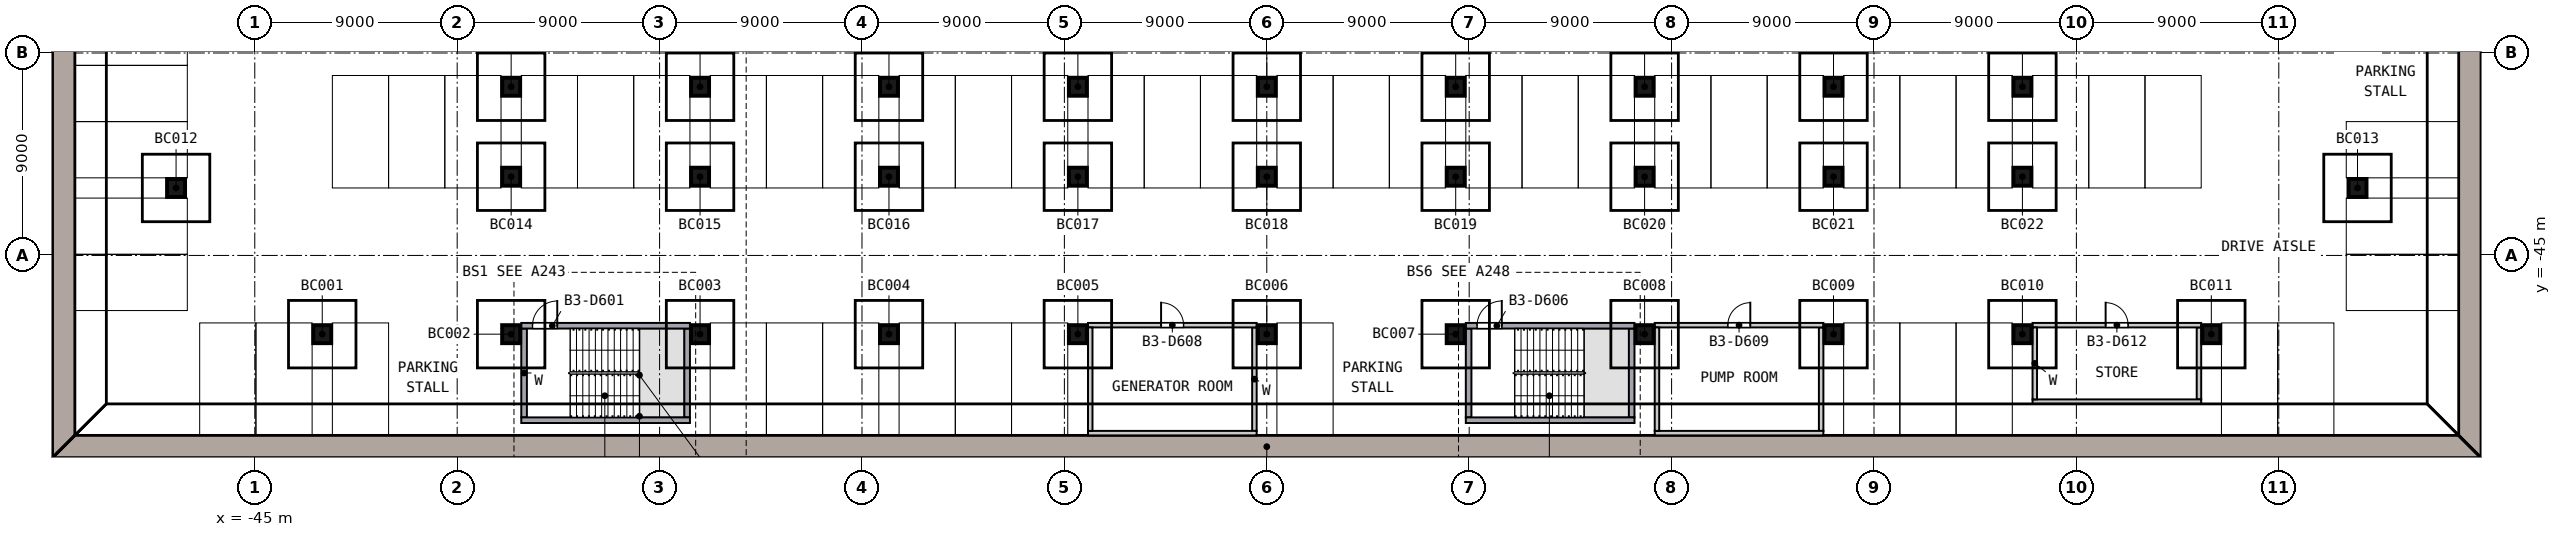
"""IFC4 building model, lengths in metres.
Left out: names, types, materials, properties, quantities, classifications, styles, units other than length and angle.
Written with IfcOpenShell. Run it as: python <this file> out.ifc"""

import sys

from ifc_helpers import new_model, si_unit, direction, frame, frame_2d, origin, origin_2d, place, context, subcontext, project, spatial, polyline, rectangle, outline, extrude, element, fill, save


model = new_model("IFC4")
c1 = context("Model", 3, precision=1e-05, world=origin(), true_north=direction((0.0, 1.0)))
c2 = subcontext(c1, "Body", "Model", "MODEL_VIEW")
j1 = project(units=[si_unit("LENGTHUNIT", "METRE"), si_unit("PLANEANGLEUNIT", "RADIAN")], contexts=[c1])
p1 = place(None, origin())
s1 = spatial("IfcSite", under=j1, at=p1, CompositionType="ELEMENT")
p2 = place(p1, origin())
s2 = spatial("IfcBuilding", under=s1, at=p2, CompositionType="ELEMENT")
p3 = place(p2, frame((0.0, 0.0, -11.7)))
s3 = spatial("IfcBuildingStorey", under=s2, at=p3, CompositionType="ELEMENT", Elevation=-11.7)
p4 = place(p3, frame((0.0, 0.0, -0.8)))
e1 = element("IfcWall", 1, at=p4, inside=s3, PredefinedType="SOLIDWALL", context=c2, shape_type="SweptSolid", body=[
    extrude(outline(polyline([(-54.0, 54.0), (-54.0, -54.0), (-53.0, -53.0), (-53.0, 53.0), (-54.0, 54.0)])), origin(), (0.0, 0.0, 1.0), 4.7),
])
p5 = place(p3, frame((0.0, 0.0, -0.8)))
e2 = element("IfcWall", 2, at=p5, inside=s3, PredefinedType="SOLIDWALL", context=c2, shape_type="SweptSolid", body=[
    extrude(outline(polyline([(-54.0, -54.0), (54.0, -54.0), (53.0, -53.0), (-53.0, -53.0), (-54.0, -54.0)])), origin(), (0.0, 0.0, 1.0), 4.7),
])
p6 = place(p3, frame((0.0, 0.0, -0.8)))
e3 = element("IfcWall", 3, at=p6, inside=s3, PredefinedType="SOLIDWALL", context=c2, shape_type="SweptSolid", body=[
    extrude(outline(polyline([(54.0, -54.0), (54.0, 54.0), (53.0, 53.0), (53.0, -53.0), (54.0, -54.0)])), origin(), (0.0, 0.0, 1.0), 4.7),
])
for number, where, z_axis, x_axis in (
    (4, (-42.0, -48.5, -0.8), (0.0, 0.0, 1.0), (1.0, 0.0, 0.0)),
    (5, (-33.6, -48.5, -0.8), (0.0, 0.0, 1.0), (1.0, 0.0, 0.0)),
    (6, (-25.2, -48.5, -0.8), (0.0, 0.0, 1.0), (1.0, 0.0, 0.0)),
    (7, (-16.8, -48.5, -0.8), (0.0, 0.0, 1.0), (1.0, 0.0, 0.0)),
    (8, (-8.4, -48.5, -0.8), (0.0, 0.0, 1.0), (1.0, 0.0, 0.0)),
    (9, (0.0, -48.5, -0.8), (0.0, 0.0, 1.0), (1.0, 0.0, 0.0)),
    (10, (8.4, -48.5, -0.8), (0.0, 0.0, 1.0), (1.0, 0.0, 0.0)),
    (11, (16.8, -48.5, -0.8), (0.0, 0.0, 1.0), (1.0, 0.0, 0.0)),
    (12, (25.2, -48.5, -0.8), (0.0, 0.0, 1.0), (1.0, 0.0, 0.0)),
    (13, (33.6, -48.5, -0.8), (0.0, 0.0, 1.0), (1.0, 0.0, 0.0)),
    (14, (42.0, -48.5, -0.8), (0.0, 0.0, 1.0), (1.0, 0.0, 0.0)),
    (15, (-48.5, -42.0, -0.8), (0.0, 0.0, 1.0), (1.0, 0.0, 0.0)),
    (16, (48.5, -42.0, -0.8), (0.0, 0.0, 1.0), (1.0, 0.0, 0.0)),
    (17, (-33.6, -41.5, -0.8), (0.0, 0.0, 1.0), (1.0, 0.0, 0.0)),
    (18, (-25.2, -41.5, -0.8), (0.0, 0.0, 1.0), (1.0, 0.0, 0.0)),
    (19, (-16.8, -41.5, -0.8), (0.0, 0.0, 1.0), (1.0, 0.0, 0.0)),
    (20, (-8.4, -41.5, -0.8), (0.0, 0.0, 1.0), (1.0, 0.0, 0.0)),
    (21, (0.0, -41.5, -0.8), (0.0, 0.0, 1.0), (1.0, 0.0, 0.0)),
    (22, (8.4, -41.5, -0.8), (0.0, 0.0, 1.0), (1.0, 0.0, 0.0)),
    (23, (16.8, -41.5, -0.8), (0.0, 0.0, 1.0), (1.0, 0.0, 0.0)),
    (24, (25.2, -41.5, -0.8), (0.0, 0.0, 1.0), (1.0, 0.0, 0.0)),
    (25, (33.6, -41.5, -0.8), (0.0, 0.0, 1.0), (1.0, 0.0, 0.0)),
    (26, (-33.6, -37.5, -0.8), (0.0, 0.0, 1.0), (1.0, 0.0, 0.0)),
    (27, (-25.2, -37.5, -0.8), (0.0, 0.0, 1.0), (1.0, 0.0, 0.0)),
    (28, (-16.8, -37.5, -0.8), (0.0, 0.0, 1.0), (1.0, 0.0, 0.0)),
    (29, (-8.4, -37.5, -0.8), (0.0, 0.0, 1.0), (1.0, 0.0, 0.0)),
    (30, (0.0, -37.5, -0.8), (0.0, 0.0, 1.0), (1.0, 0.0, 0.0)),
    (31, (8.4, -37.5, -0.8), (0.0, 0.0, 1.0), (1.0, 0.0, 0.0)),
    (32, (16.8, -37.5, -0.8), (0.0, 0.0, 1.0), (1.0, 0.0, 0.0)),
    (33, (25.2, -37.5, -0.8), (0.0, 0.0, 1.0), (1.0, 0.0, 0.0)),
    (34, (33.6, -37.5, -0.8), (0.0, 0.0, 1.0), (1.0, 0.0, 0.0)),
):
    element("IfcColumn", number, at=place(p3, frame(where, z_axis=z_axis, x_axis=x_axis)), inside=s3, PredefinedType="COLUMN", context=c2, shape_type="SweptSolid", body=[
        extrude(rectangle(XDim=0.8, YDim=0.8, at=origin_2d()), origin(), (0.0, 0.0, 1.0), 4.7),
    ])
p7 = place(p3, frame((-33.15, -48.125, 0.0), z_axis=(0.0, 0.0, 1.0), x_axis=(1.0, 0.0, 0.0)))
e35 = element("IfcWall", 35, at=p7, inside=s3, PredefinedType="SOLIDWALL", context=c2, shape_type="SweptSolid", body=[
    extrude(rectangle(XDim=7.5, YDim=0.25, at=frame_2d((3.75, 0.0))), origin(), (0.0, 0.0, 1.0), 3.9),
])
p8 = place(p7, frame((0.5, 0.0, 0.0)))
e36 = element("IfcOpeningElement", 36, at=p8, cuts=e35, PredefinedType="OPENING", context=c2, shape_type="SweptSolid", body=[
    extrude(rectangle(XDim=1.1, YDim=2.1, at=frame_2d((0.55, 1.05))), frame((0.0, 0.135, 0.0), z_axis=(0.0, -1.0, 0.0), x_axis=(1.0, 0.0, 0.0)), (0.0, 0.0, 1.0), 0.27),
])
p9 = place(p3, frame((-33.15, -52.325, 0.0), z_axis=(0.0, 0.0, 1.0), x_axis=(1.0, 0.0, 0.0)))
e37 = element("IfcWall", 37, at=p9, inside=s3, PredefinedType="SOLIDWALL", context=c2, shape_type="SweptSolid", body=[
    extrude(rectangle(XDim=7.5, YDim=0.25, at=frame_2d((3.75, 0.0))), origin(), (0.0, 0.0, 1.0), 3.9),
])
for number, where, z_axis, x_axis in (
    (38, (-33.025, -52.2, 0.0), (0.0, 0.0, 1.0), (0.0, 1.0, 0.0)),
    (39, (-25.775, -52.2, 0.0), (0.0, 0.0, 1.0), (0.0, 1.0, 0.0)),
):
    element("IfcWall", number, at=place(p3, frame(where, z_axis=z_axis, x_axis=x_axis)), inside=s3, PredefinedType="SOLIDWALL", context=c2, shape_type="SweptSolid", body=[
        extrude(rectangle(XDim=3.95, YDim=0.25, at=frame_2d((1.975, 0.0))), origin(), (0.0, 0.0, 1.0), 3.9),
    ])
p10 = place(p3, frame((8.85, -48.125, 0.0), z_axis=(0.0, 0.0, 1.0), x_axis=(1.0, 0.0, 0.0)))
e40 = element("IfcWall", 40, at=p10, inside=s3, PredefinedType="SOLIDWALL", context=c2, shape_type="SweptSolid", body=[
    extrude(rectangle(XDim=7.5, YDim=0.25, at=frame_2d((3.75, 0.0))), origin(), (0.0, 0.0, 1.0), 3.9),
])
p11 = place(p10, frame((0.5, 0.0, 0.0)))
e41 = element("IfcOpeningElement", 41, at=p11, cuts=e40, PredefinedType="OPENING", context=c2, shape_type="SweptSolid", body=[
    extrude(rectangle(XDim=1.1, YDim=2.1, at=frame_2d((0.55, 1.05))), frame((0.0, 0.135, 0.0), z_axis=(0.0, -1.0, 0.0), x_axis=(1.0, 0.0, 0.0)), (0.0, 0.0, 1.0), 0.27),
])
p12 = place(p3, frame((8.85, -52.325, 0.0), z_axis=(0.0, 0.0, 1.0), x_axis=(1.0, 0.0, 0.0)))
e42 = element("IfcWall", 42, at=p12, inside=s3, PredefinedType="SOLIDWALL", context=c2, shape_type="SweptSolid", body=[
    extrude(rectangle(XDim=7.5, YDim=0.25, at=frame_2d((3.75, 0.0))), origin(), (0.0, 0.0, 1.0), 3.9),
])
for number, where, z_axis, x_axis in (
    (43, (8.975, -52.2, 0.0), (0.0, 0.0, 1.0), (0.0, 1.0, 0.0)),
    (44, (16.225, -52.2, 0.0), (0.0, 0.0, 1.0), (0.0, 1.0, 0.0)),
):
    element("IfcWall", number, at=place(p3, frame(where, z_axis=z_axis, x_axis=x_axis)), inside=s3, PredefinedType="SOLIDWALL", context=c2, shape_type="SweptSolid", body=[
        extrude(rectangle(XDim=3.95, YDim=0.25, at=frame_2d((1.975, 0.0))), origin(), (0.0, 0.0, 1.0), 3.9),
    ])
p13 = place(p3, frame((-7.95, -48.1, 0.0), z_axis=(0.0, 0.0, 1.0), x_axis=(1.0, 0.0, 0.0)))
e45 = element("IfcWall", 45, at=p13, inside=s3, PredefinedType="PARTITIONING", context=c2, shape_type="SweptSolid", body=[
    extrude(rectangle(XDim=7.5, YDim=0.2, at=frame_2d((3.75, 0.0))), origin(), (0.0, 0.0, 1.0), 3.45),
])
p14 = place(p13, frame((3.25, 0.0, 0.0)))
e46 = element("IfcOpeningElement", 46, at=p14, cuts=e45, PredefinedType="OPENING", context=c2, shape_type="SweptSolid", body=[
    extrude(rectangle(XDim=1.0, YDim=2.1, at=frame_2d((0.5, 1.05))), frame((0.0, 0.11, 0.0), z_axis=(0.0, -1.0, 0.0), x_axis=(1.0, 0.0, 0.0)), (0.0, 0.0, 1.0), 0.22),
])
p15 = place(p3, frame((-7.95, -52.9, 0.0), z_axis=(0.0, 0.0, 1.0), x_axis=(1.0, 0.0, 0.0)))
e47 = element("IfcWall", 47, at=p15, inside=s3, PredefinedType="PARTITIONING", context=c2, shape_type="SweptSolid", body=[
    extrude(rectangle(XDim=7.5, YDim=0.2, at=frame_2d((3.75, 0.0))), origin(), (0.0, 0.0, 1.0), 3.45),
])
for number, where, z_axis, x_axis in (
    (48, (-7.85, -52.8, 0.0), (0.0, 0.0, 1.0), (0.0, 1.0, 0.0)),
    (49, (-0.55, -52.8, 0.0), (0.0, 0.0, 1.0), (0.0, 1.0, 0.0)),
):
    element("IfcWall", number, at=place(p3, frame(where, z_axis=z_axis, x_axis=x_axis)), inside=s3, PredefinedType="PARTITIONING", context=c2, shape_type="SweptSolid", body=[
        extrude(rectangle(XDim=4.6, YDim=0.2, at=frame_2d((2.3, 0.0))), origin(), (0.0, 0.0, 1.0), 3.45),
    ])
p16 = place(p3, frame((17.25, -48.1, 0.0), z_axis=(0.0, 0.0, 1.0), x_axis=(1.0, 0.0, 0.0)))
e50 = element("IfcWall", 50, at=p16, inside=s3, PredefinedType="PARTITIONING", context=c2, shape_type="SweptSolid", body=[
    extrude(rectangle(XDim=7.5, YDim=0.2, at=frame_2d((3.75, 0.0))), origin(), (0.0, 0.0, 1.0), 3.45),
])
p17 = place(p16, frame((3.25, 0.0, 0.0)))
e51 = element("IfcOpeningElement", 51, at=p17, cuts=e50, PredefinedType="OPENING", context=c2, shape_type="SweptSolid", body=[
    extrude(rectangle(XDim=1.0, YDim=2.1, at=frame_2d((0.5, 1.05))), frame((0.0, 0.11, 0.0), z_axis=(0.0, -1.0, 0.0), x_axis=(1.0, 0.0, 0.0)), (0.0, 0.0, 1.0), 0.22),
])
p18 = place(p3, frame((17.25, -52.9, 0.0), z_axis=(0.0, 0.0, 1.0), x_axis=(1.0, 0.0, 0.0)))
e52 = element("IfcWall", 52, at=p18, inside=s3, PredefinedType="PARTITIONING", context=c2, shape_type="SweptSolid", body=[
    extrude(rectangle(XDim=7.5, YDim=0.2, at=frame_2d((3.75, 0.0))), origin(), (0.0, 0.0, 1.0), 3.45),
])
for number, where, z_axis, x_axis in (
    (53, (17.35, -52.8, 0.0), (0.0, 0.0, 1.0), (0.0, 1.0, 0.0)),
    (54, (24.65, -52.8, 0.0), (0.0, 0.0, 1.0), (0.0, 1.0, 0.0)),
):
    element("IfcWall", number, at=place(p3, frame(where, z_axis=z_axis, x_axis=x_axis)), inside=s3, PredefinedType="PARTITIONING", context=c2, shape_type="SweptSolid", body=[
        extrude(rectangle(XDim=4.6, YDim=0.2, at=frame_2d((2.3, 0.0))), origin(), (0.0, 0.0, 1.0), 3.45),
    ])
p19 = place(p3, frame((34.05, -48.1, 0.0), z_axis=(0.0, 0.0, 1.0), x_axis=(1.0, 0.0, 0.0)))
e55 = element("IfcWall", 55, at=p19, inside=s3, PredefinedType="PARTITIONING", context=c2, shape_type="SweptSolid", body=[
    extrude(rectangle(XDim=7.5, YDim=0.2, at=frame_2d((3.75, 0.0))), origin(), (0.0, 0.0, 1.0), 3.45),
])
p20 = place(p19, frame((3.25, 0.0, 0.0)))
e56 = element("IfcOpeningElement", 56, at=p20, cuts=e55, PredefinedType="OPENING", context=c2, shape_type="SweptSolid", body=[
    extrude(rectangle(XDim=1.0, YDim=2.1, at=frame_2d((0.5, 1.05))), frame((0.0, 0.11, 0.0), z_axis=(0.0, -1.0, 0.0), x_axis=(1.0, 0.0, 0.0)), (0.0, 0.0, 1.0), 0.22),
])
p21 = place(p3, frame((34.05, -51.5, 0.0), z_axis=(0.0, 0.0, 1.0), x_axis=(1.0, 0.0, 0.0)))
e57 = element("IfcWall", 57, at=p21, inside=s3, PredefinedType="PARTITIONING", context=c2, shape_type="SweptSolid", body=[
    extrude(rectangle(XDim=7.5, YDim=0.2, at=frame_2d((3.75, 0.0))), origin(), (0.0, 0.0, 1.0), 3.45),
])
for number, where, z_axis, x_axis in (
    (58, (34.15, -51.4, 0.0), (0.0, 0.0, 1.0), (0.0, 1.0, 0.0)),
    (59, (41.45, -51.4, 0.0), (0.0, 0.0, 1.0), (0.0, 1.0, 0.0)),
):
    element("IfcWall", number, at=place(p3, frame(where, z_axis=z_axis, x_axis=x_axis)), inside=s3, PredefinedType="PARTITIONING", context=c2, shape_type="SweptSolid", body=[
        extrude(rectangle(XDim=3.2, YDim=0.2, at=frame_2d((1.6, 0.0))), origin(), (0.0, 0.0, 1.0), 3.45),
    ])
p22 = place(p8, origin())
e60 = element("IfcDoor", 60, at=p22, inside=s3, OperationType="SINGLE_SWING_RIGHT", PredefinedType="DOOR", context=c2, shape_type="SweptSolid", body=[
    extrude(rectangle(XDim=1.1, YDim=2.1, at=frame_2d((0.55, 1.05))), frame((0.0, 0.025, 0.0), z_axis=(0.0, -1.0, 0.0), x_axis=(1.0, 0.0, 0.0)), (0.0, 0.0, 1.0), 0.05),
])
fill(e36, e60)
p23 = place(p11, origin())
e61 = element("IfcDoor", 61, at=p23, inside=s3, OperationType="SINGLE_SWING_RIGHT", PredefinedType="DOOR", context=c2, shape_type="SweptSolid", body=[
    extrude(rectangle(XDim=1.1, YDim=2.1, at=frame_2d((0.55, 1.05))), frame((0.0, 0.025, 0.0), z_axis=(0.0, -1.0, 0.0), x_axis=(1.0, 0.0, 0.0)), (0.0, 0.0, 1.0), 0.05),
])
fill(e41, e61)
p24 = place(p14, origin())
e62 = element("IfcDoor", 62, at=p24, inside=s3, OperationType="SINGLE_SWING_LEFT", PredefinedType="DOOR", context=c2, shape_type="SweptSolid", body=[
    extrude(rectangle(XDim=1.0, YDim=2.1, at=frame_2d((0.5, 1.05))), frame((0.0, 0.025, 0.0), z_axis=(0.0, -1.0, 0.0), x_axis=(1.0, 0.0, 0.0)), (0.0, 0.0, 1.0), 0.05),
])
fill(e46, e62)
p25 = place(p17, origin())
e63 = element("IfcDoor", 63, at=p25, inside=s3, OperationType="SINGLE_SWING_RIGHT", PredefinedType="DOOR", context=c2, shape_type="SweptSolid", body=[
    extrude(rectangle(XDim=1.0, YDim=2.1, at=frame_2d((0.5, 1.05))), frame((0.0, 0.025, 0.0), z_axis=(0.0, -1.0, 0.0), x_axis=(1.0, 0.0, 0.0)), (0.0, 0.0, 1.0), 0.05),
])
fill(e51, e63)
p26 = place(p20, origin())
e64 = element("IfcDoor", 64, at=p26, inside=s3, OperationType="SINGLE_SWING_LEFT", PredefinedType="DOOR", context=c2, shape_type="SweptSolid", body=[
    extrude(rectangle(XDim=1.0, YDim=2.1, at=frame_2d((0.5, 1.05))), frame((0.0, 0.025, 0.0), z_axis=(0.0, -1.0, 0.0), x_axis=(1.0, 0.0, 0.0)), (0.0, 0.0, 1.0), 0.05),
])
fill(e56, e64)
save(model, sys.argv[1])
